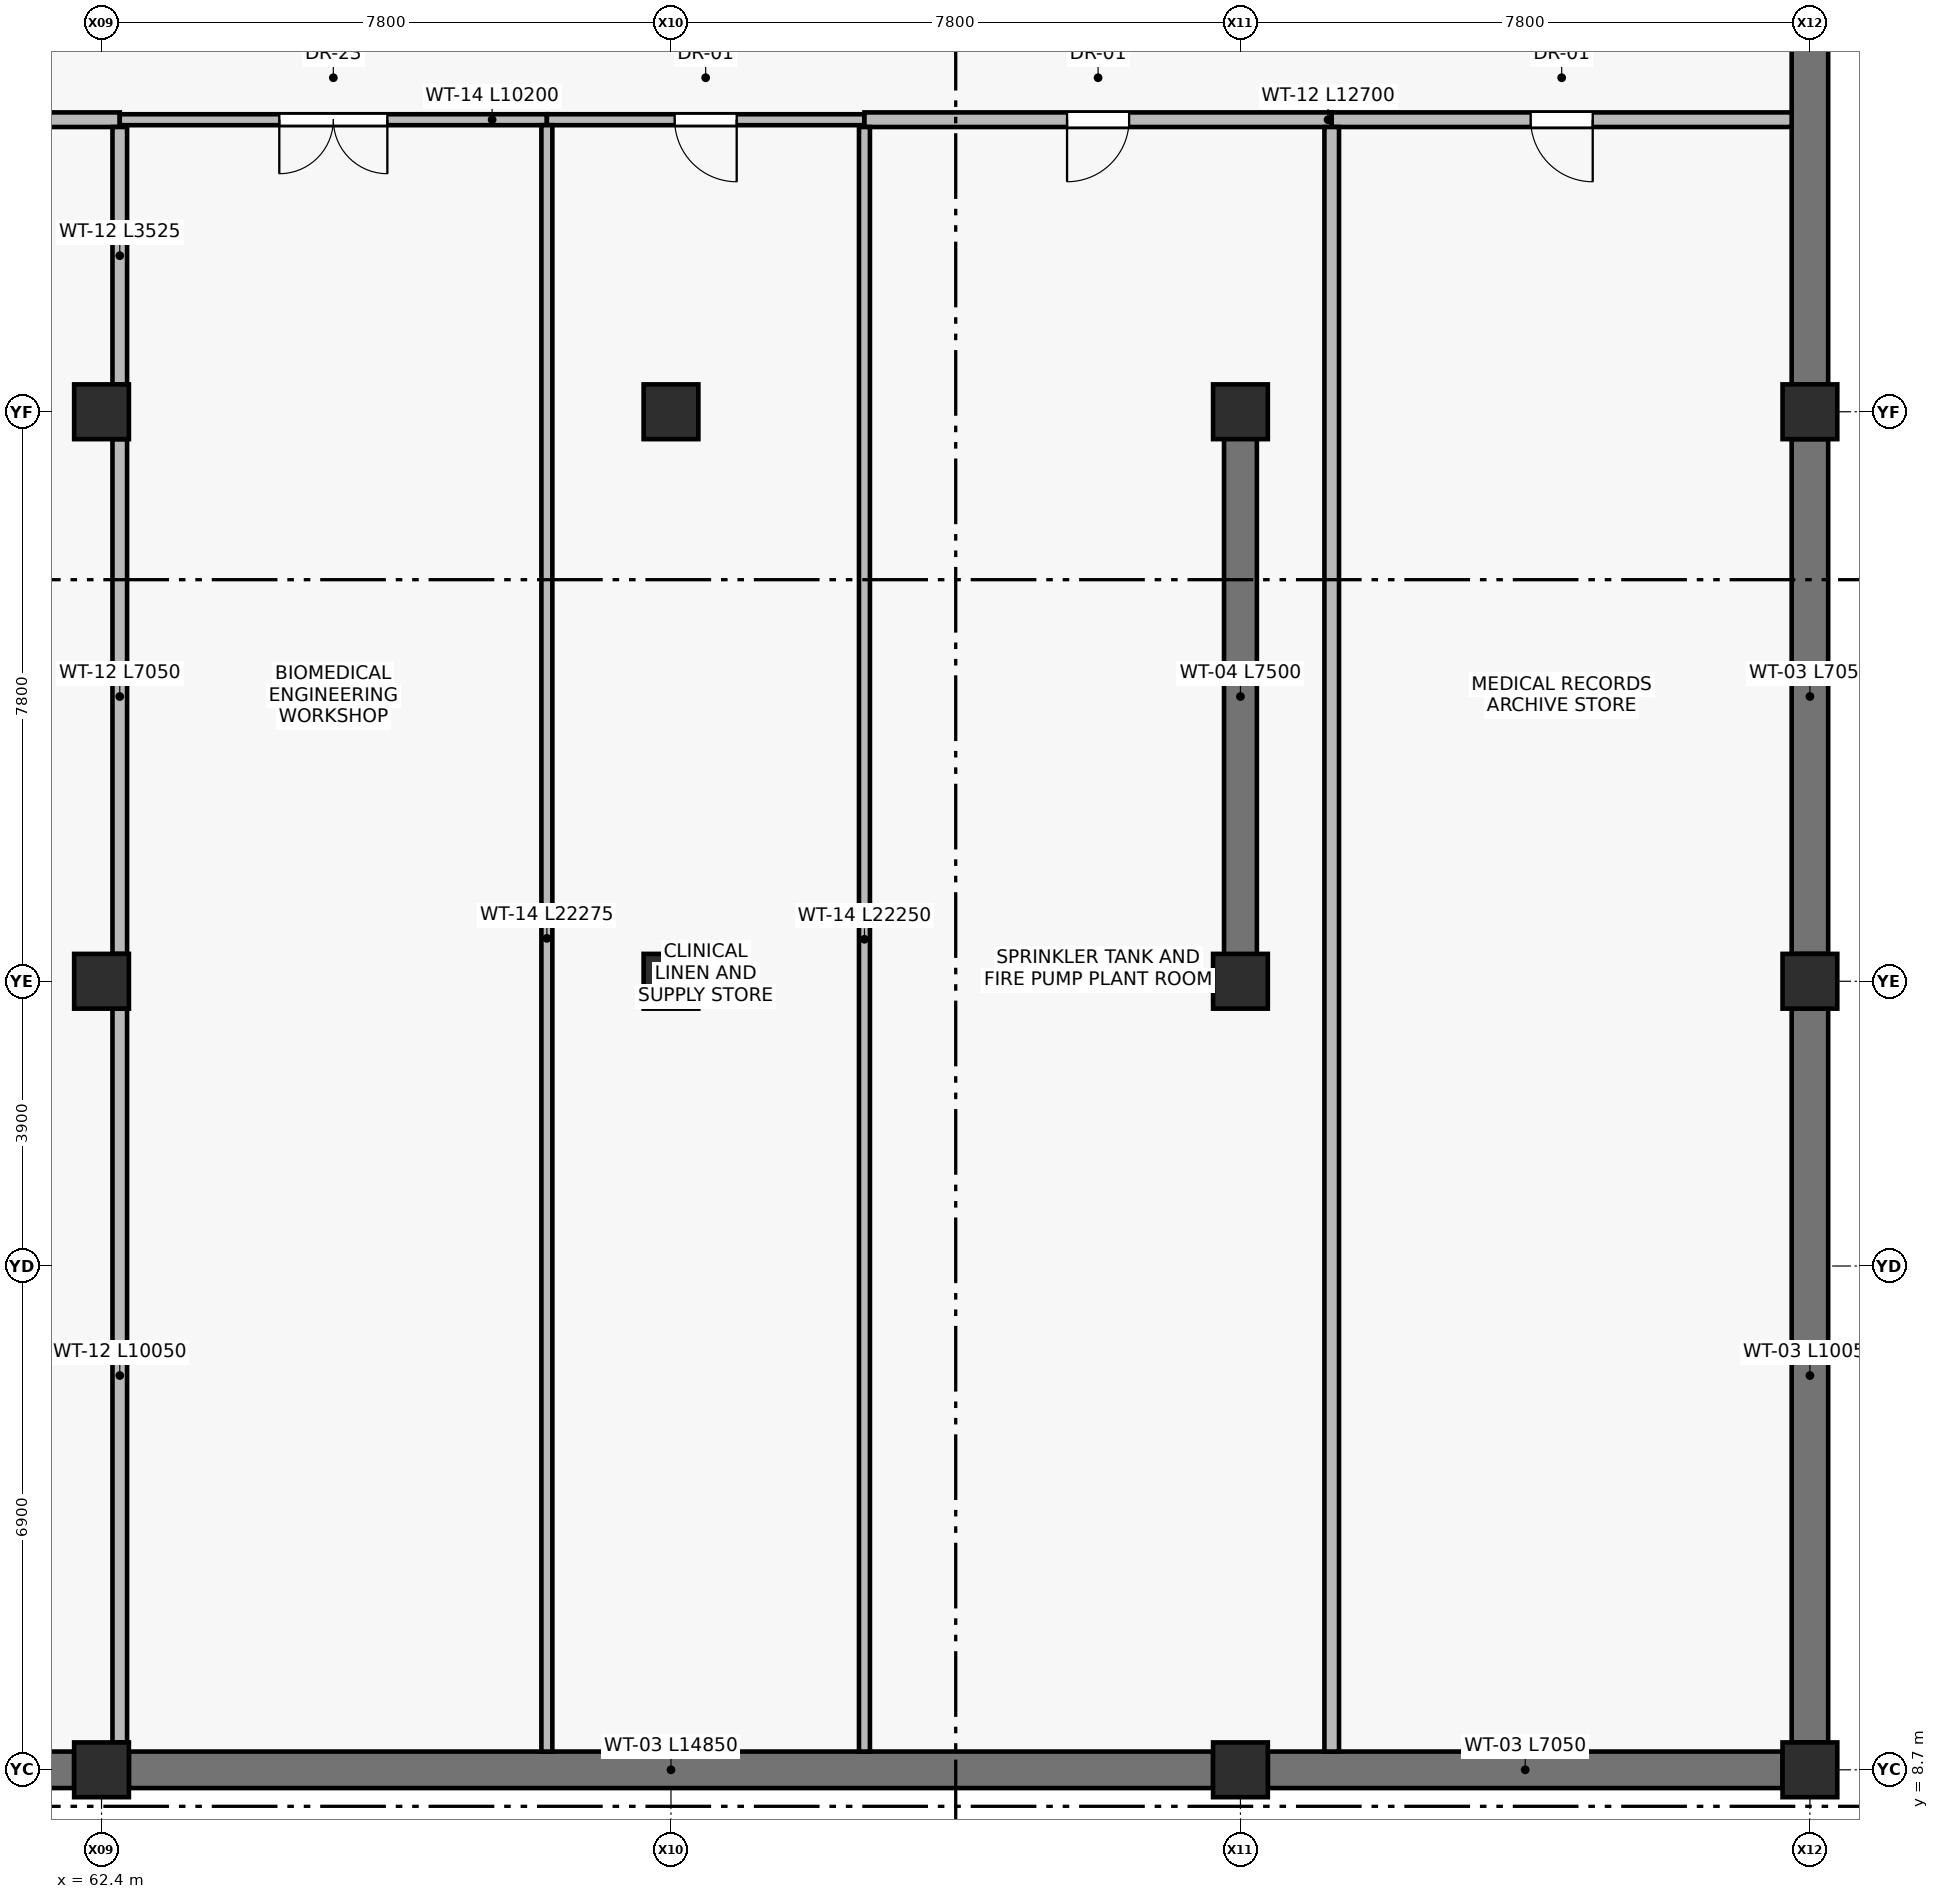
"""IFC4 building model, lengths in metres.
Left out: names, types, materials, properties, quantities, classifications, styles, units other than length and angle.
Written with IfcOpenShell. Run it as: python <this file> out.ifc"""

import sys

from ifc_helpers import new_model, si_unit, direction, frame, frame_2d, origin, origin_2d, place, context, subcontext, project, spatial, rectangle, extrude, element, fill, save


model = new_model("IFC4")
c1 = context("Model", 3, precision=1e-05, world=origin(), true_north=direction((0.0, 1.0)))
c2 = subcontext(c1, "Body", "Model", "MODEL_VIEW")
j1 = project(units=[si_unit("LENGTHUNIT", "METRE"), si_unit("PLANEANGLEUNIT", "RADIAN")], contexts=[c1])
p1 = place(None, origin())
s1 = spatial("IfcSite", under=j1, at=p1, CompositionType="ELEMENT")
p2 = place(p1, origin())
s2 = spatial("IfcBuilding", under=s1, at=p2, CompositionType="ELEMENT")
p3 = place(p2, frame((0.0, 0.0, -4.5)))
s3 = spatial("IfcBuildingStorey", under=s2, at=p3, CompositionType="ELEMENT", Elevation=-4.5)
for number, where, z_axis, x_axis in (
    (1, (62.4, 19.5, 0.0), (0.0, 0.0, 1.0), (1.0, 0.0, 0.0)),
    (2, (62.4, 27.3, 0.0), (0.0, 0.0, 1.0), (1.0, 0.0, 0.0)),
    (3, (70.2, 19.5, 0.0), (0.0, 0.0, 1.0), (1.0, 0.0, 0.0)),
    (4, (70.2, 27.3, 0.0), (0.0, 0.0, 1.0), (1.0, 0.0, 0.0)),
    (5, (78.0, 19.5, 0.0), (0.0, 0.0, 1.0), (1.0, 0.0, 0.0)),
    (6, (78.0, 27.3, 0.0), (0.0, 0.0, 1.0), (1.0, 0.0, 0.0)),
    (7, (85.8, 19.5, 0.0), (0.0, 0.0, 1.0), (1.0, 0.0, 0.0)),
    (8, (85.8, 27.3, 0.0), (0.0, 0.0, 1.0), (1.0, 0.0, 0.0)),
    (9, (62.4, 8.7, 0.0), (0.0, 0.0, 1.0), (1.0, 0.0, 0.0)),
    (10, (78.0, 8.7, 0.0), (0.0, 0.0, 1.0), (1.0, 0.0, 0.0)),
    (11, (85.8, 8.7, 0.0), (0.0, 0.0, 1.0), (1.0, 0.0, 0.0)),
):
    element("IfcColumn", number, at=place(p3, frame(where, z_axis=z_axis, x_axis=x_axis)), inside=s3, PredefinedType="COLUMN", context=c2, shape_type="SweptSolid", body=[
        extrude(rectangle(XDim=0.75, YDim=0.75, at=origin_2d()), origin(), (0.0, 0.0, 1.0), 4.5),
    ])
for number, where, z_axis, x_axis in (
    (12, (85.8, 34.725, 0.0), (0.0, 0.0, 1.0), (0.0, -1.0, 0.0)),
    (13, (85.8, 26.925, 0.0), (0.0, 0.0, 1.0), (0.0, -1.0, 0.0)),
):
    element("IfcWall", number, at=place(p3, frame(where, z_axis=z_axis, x_axis=x_axis)), inside=s3, PredefinedType="SOLIDWALL", context=c2, shape_type="SweptSolid", body=[
        extrude(rectangle(XDim=7.05, YDim=0.5, at=frame_2d((3.525, 0.0))), origin(), (0.0, 0.0, 1.0), 4.12),
    ])
p4 = place(p3, frame((85.8, 19.125, 0.0), z_axis=(0.0, 0.0, 1.0), x_axis=(0.0, -1.0, 0.0)))
e14 = element("IfcWall", 14, at=p4, inside=s3, PredefinedType="SOLIDWALL", context=c2, shape_type="SweptSolid", body=[
    extrude(rectangle(XDim=10.05, YDim=0.5, at=frame_2d((5.025, 0.0))), origin(), (0.0, 0.0, 1.0), 4.12),
])
p5 = place(p3, frame((85.425, 8.7, 0.0), z_axis=(0.0, 0.0, 1.0), x_axis=(-1.0, 0.0, 0.0)))
e15 = element("IfcWall", 15, at=p5, inside=s3, PredefinedType="SOLIDWALL", context=c2, shape_type="SweptSolid", body=[
    extrude(rectangle(XDim=7.05, YDim=0.5, at=frame_2d((3.525, 0.0))), origin(), (0.0, 0.0, 1.0), 4.12),
])
p6 = place(p3, frame((77.625, 8.7, 0.0), z_axis=(0.0, 0.0, 1.0), x_axis=(-1.0, 0.0, 0.0)))
e16 = element("IfcWall", 16, at=p6, inside=s3, PredefinedType="SOLIDWALL", context=c2, shape_type="SweptSolid", body=[
    extrude(rectangle(XDim=14.85, YDim=0.5, at=frame_2d((7.425, 0.0))), origin(), (0.0, 0.0, 1.0), 4.12),
])
p7 = place(p3, frame((62.025, 8.7, 0.0), z_axis=(0.0, 0.0, 1.0), x_axis=(-1.0, 0.0, 0.0)))
e17 = element("IfcWall", 17, at=p7, inside=s3, PredefinedType="SOLIDWALL", context=c2, shape_type="SweptSolid", body=[
    extrude(rectangle(XDim=7.05, YDim=0.5, at=frame_2d((3.525, 0.0))), origin(), (0.0, 0.0, 1.0), 4.12),
])
p8 = place(p3, frame((78.0, 19.65, 0.0), z_axis=(0.0, 0.0, 1.0), x_axis=(0.0, 1.0, 0.0)))
e18 = element("IfcWall", 18, at=p8, inside=s3, PredefinedType="SHEAR", context=c2, shape_type="SweptSolid", body=[
    extrude(rectangle(XDim=7.5, YDim=0.45, at=frame_2d((3.75, 0.0))), origin(), (0.0, 0.0, 1.0), 4.2),
])
p9 = place(p3, frame((62.65, 31.3, 0.0), z_axis=(0.0, 0.0, 1.0), x_axis=(-1.0, 0.0, 0.0)))
e19 = element("IfcWall", 19, at=p9, inside=s3, PredefinedType="SOLIDWALL", context=c2, shape_type="SweptSolid", body=[
    extrude(rectangle(XDim=7.8, YDim=0.2, at=frame_2d((3.9, 0.0))), origin(), (0.0, 0.0, 1.0), 4.2),
])
p10 = place(p9, frame((3.475, 0.0, 0.0)))
e20 = element("IfcOpeningElement", 20, at=p10, cuts=e19, PredefinedType="OPENING", context=c2, shape_type="SweptSolid", body=[
    extrude(rectangle(XDim=0.85, YDim=2.1, at=frame_2d((0.425, 1.05))), frame((0.0, 0.11, 0.0), z_axis=(0.0, -1.0, 0.0), x_axis=(1.0, 0.0, 0.0)), (0.0, 0.0, 1.0), 0.22),
])
p11 = place(p3, frame((68.5, 31.3, 0.0), z_axis=(0.0, 0.0, 1.0), x_axis=(-1.0, 0.0, 0.0)))
e21 = element("IfcWall", 21, at=p11, inside=s3, PredefinedType="PARTITIONING", context=c2, shape_type="SweptSolid", body=[
    extrude(rectangle(XDim=5.85, YDim=0.15, at=frame_2d((2.925, 0.0))), origin(), (0.0, 0.0, 1.0), 4.2),
])
p12 = place(p11, frame((2.185, 0.0, 0.0)))
e22 = element("IfcOpeningElement", 22, at=p12, cuts=e21, PredefinedType="OPENING", context=c2, shape_type="SweptSolid", body=[
    extrude(rectangle(XDim=1.48, YDim=2.25, at=frame_2d((0.74, 1.125))), frame((0.0, 0.085, 0.0), z_axis=(0.0, -1.0, 0.0), x_axis=(1.0, 0.0, 0.0)), (0.0, 0.0, 1.0), 0.17),
])
p13 = place(p3, frame((72.85, 31.3, 0.0), z_axis=(0.0, 0.0, 1.0), x_axis=(-1.0, 0.0, 0.0)))
e23 = element("IfcWall", 23, at=p13, inside=s3, PredefinedType="PARTITIONING", context=c2, shape_type="SweptSolid", body=[
    extrude(rectangle(XDim=4.35, YDim=0.15, at=frame_2d((2.175, 0.0))), origin(), (0.0, 0.0, 1.0), 4.2),
])
p14 = place(p13, frame((1.75, 0.0, 0.0)))
e24 = element("IfcOpeningElement", 24, at=p14, cuts=e23, PredefinedType="OPENING", context=c2, shape_type="SweptSolid", body=[
    extrude(rectangle(XDim=0.85, YDim=2.1, at=frame_2d((0.425, 1.05))), frame((0.0, 0.085, 0.0), z_axis=(0.0, -1.0, 0.0), x_axis=(1.0, 0.0, 0.0)), (0.0, 0.0, 1.0), 0.17),
])
p15 = place(p3, frame((79.25, 31.3, 0.0), z_axis=(0.0, 0.0, 1.0), x_axis=(-1.0, 0.0, 0.0)))
e25 = element("IfcWall", 25, at=p15, inside=s3, PredefinedType="SOLIDWALL", context=c2, shape_type="SweptSolid", body=[
    extrude(rectangle(XDim=6.4, YDim=0.2, at=frame_2d((3.2, 0.0))), origin(), (0.0, 0.0, 1.0), 4.2),
])
p16 = place(p15, frame((2.775, 0.0, 0.0)))
e26 = element("IfcOpeningElement", 26, at=p16, cuts=e25, PredefinedType="OPENING", context=c2, shape_type="SweptSolid", body=[
    extrude(rectangle(XDim=0.85, YDim=2.1, at=frame_2d((0.425, 1.05))), frame((0.0, 0.11, 0.0), z_axis=(0.0, -1.0, 0.0), x_axis=(1.0, 0.0, 0.0)), (0.0, 0.0, 1.0), 0.22),
])
p17 = place(p3, frame((85.55, 31.3, 0.0), z_axis=(0.0, 0.0, 1.0), x_axis=(-1.0, 0.0, 0.0)))
e27 = element("IfcWall", 27, at=p17, inside=s3, PredefinedType="SOLIDWALL", context=c2, shape_type="SweptSolid", body=[
    extrude(rectangle(XDim=6.3, YDim=0.2, at=frame_2d((3.15, 0.0))), origin(), (0.0, 0.0, 1.0), 4.2),
])
p18 = place(p17, frame((2.725, 0.0, 0.0)))
e28 = element("IfcOpeningElement", 28, at=p18, cuts=e27, PredefinedType="OPENING", context=c2, shape_type="SweptSolid", body=[
    extrude(rectangle(XDim=0.85, YDim=2.1, at=frame_2d((0.425, 1.05))), frame((0.0, 0.11, 0.0), z_axis=(0.0, -1.0, 0.0), x_axis=(1.0, 0.0, 0.0)), (0.0, 0.0, 1.0), 0.22),
])
p19 = place(p3, frame((62.65, 9.075, 0.0), z_axis=(0.0, 0.0, 1.0), x_axis=(0.0, 1.0, 0.0)))
e29 = element("IfcWall", 29, at=p19, inside=s3, PredefinedType="SOLIDWALL", context=c2, shape_type="SweptSolid", body=[
    extrude(rectangle(XDim=10.05, YDim=0.2, at=frame_2d((5.025, 0.0))), origin(), (0.0, 0.0, 1.0), 3.5),
])
p20 = place(p3, frame((62.65, 19.875, 0.0), z_axis=(0.0, 0.0, 1.0), x_axis=(0.0, 1.0, 0.0)))
e30 = element("IfcWall", 30, at=p20, inside=s3, PredefinedType="SOLIDWALL", context=c2, shape_type="SweptSolid", body=[
    extrude(rectangle(XDim=7.05, YDim=0.2, at=frame_2d((3.525, 0.0))), origin(), (0.0, 0.0, 1.0), 3.75),
])
p21 = place(p3, frame((62.65, 27.675, 0.0), z_axis=(0.0, 0.0, 1.0), x_axis=(0.0, 1.0, 0.0)))
e31 = element("IfcWall", 31, at=p21, inside=s3, PredefinedType="SOLIDWALL", context=c2, shape_type="SweptSolid", body=[
    extrude(rectangle(XDim=3.525, YDim=0.2, at=frame_2d((1.762, 0.0))), origin(), (0.0, 0.0, 1.0), 3.75),
])
p22 = place(p3, frame((68.5, 8.95, 0.0), z_axis=(0.0, 0.0, 1.0), x_axis=(0.0, 1.0, 0.0)))
e32 = element("IfcWall", 32, at=p22, inside=s3, PredefinedType="PARTITIONING", context=c2, shape_type="SweptSolid", body=[
    extrude(rectangle(XDim=22.275, YDim=0.15, at=frame_2d((11.138, 0.0))), origin(), (0.0, 0.0, 1.0), 4.2),
])
p23 = place(p3, frame((72.85, 8.95, 0.0), z_axis=(0.0, 0.0, 1.0), x_axis=(0.0, 1.0, 0.0)))
e33 = element("IfcWall", 33, at=p23, inside=s3, PredefinedType="PARTITIONING", context=c2, shape_type="SweptSolid", body=[
    extrude(rectangle(XDim=22.25, YDim=0.15, at=frame_2d((11.125, 0.0))), origin(), (0.0, 0.0, 1.0), 3.84),
])
p24 = place(p3, frame((79.25, 8.95, 0.0), z_axis=(0.0, 0.0, 1.0), x_axis=(0.0, 1.0, 0.0)))
e34 = element("IfcWall", 34, at=p24, inside=s3, PredefinedType="SOLIDWALL", context=c2, shape_type="SweptSolid", body=[
    extrude(rectangle(XDim=22.25, YDim=0.2, at=frame_2d((11.125, 0.0))), origin(), (0.0, 0.0, 1.0), 4.2),
])
p25 = place(p12, origin())
e35 = element("IfcDoor", 35, at=p25, inside=s3, OperationType="DOUBLE_DOOR_SINGLE_SWING", PredefinedType="DOOR", context=c2, shape_type="SweptSolid", body=[
    extrude(rectangle(XDim=1.48, YDim=2.25, at=frame_2d((0.74, 1.125))), frame((0.0, 0.025, 0.0), z_axis=(0.0, -1.0, 0.0), x_axis=(1.0, 0.0, 0.0)), (0.0, 0.0, 1.0), 0.05),
])
fill(e22, e35)
p26 = place(p14, origin())
e36 = element("IfcDoor", 36, at=p26, inside=s3, OperationType="SINGLE_SWING_LEFT", PredefinedType="DOOR", context=c2, shape_type="SweptSolid", body=[
    extrude(rectangle(XDim=0.85, YDim=2.1, at=frame_2d((0.425, 1.05))), frame((0.0, 0.025, 0.0), z_axis=(0.0, -1.0, 0.0), x_axis=(1.0, 0.0, 0.0)), (0.0, 0.0, 1.0), 0.05),
])
fill(e24, e36)
p27 = place(p16, origin())
e37 = element("IfcDoor", 37, at=p27, inside=s3, OperationType="SINGLE_SWING_RIGHT", PredefinedType="DOOR", context=c2, shape_type="SweptSolid", body=[
    extrude(rectangle(XDim=0.85, YDim=2.1, at=frame_2d((0.425, 1.05))), frame((0.0, 0.025, 0.0), z_axis=(0.0, -1.0, 0.0), x_axis=(1.0, 0.0, 0.0)), (0.0, 0.0, 1.0), 0.05),
])
fill(e26, e37)
p28 = place(p18, origin())
e38 = element("IfcDoor", 38, at=p28, inside=s3, OperationType="SINGLE_SWING_LEFT", PredefinedType="DOOR", context=c2, shape_type="SweptSolid", body=[
    extrude(rectangle(XDim=0.85, YDim=2.1, at=frame_2d((0.425, 1.05))), frame((0.0, 0.025, 0.0), z_axis=(0.0, -1.0, 0.0), x_axis=(1.0, 0.0, 0.0)), (0.0, 0.0, 1.0), 0.05),
])
fill(e28, e38)
save(model, sys.argv[1])
